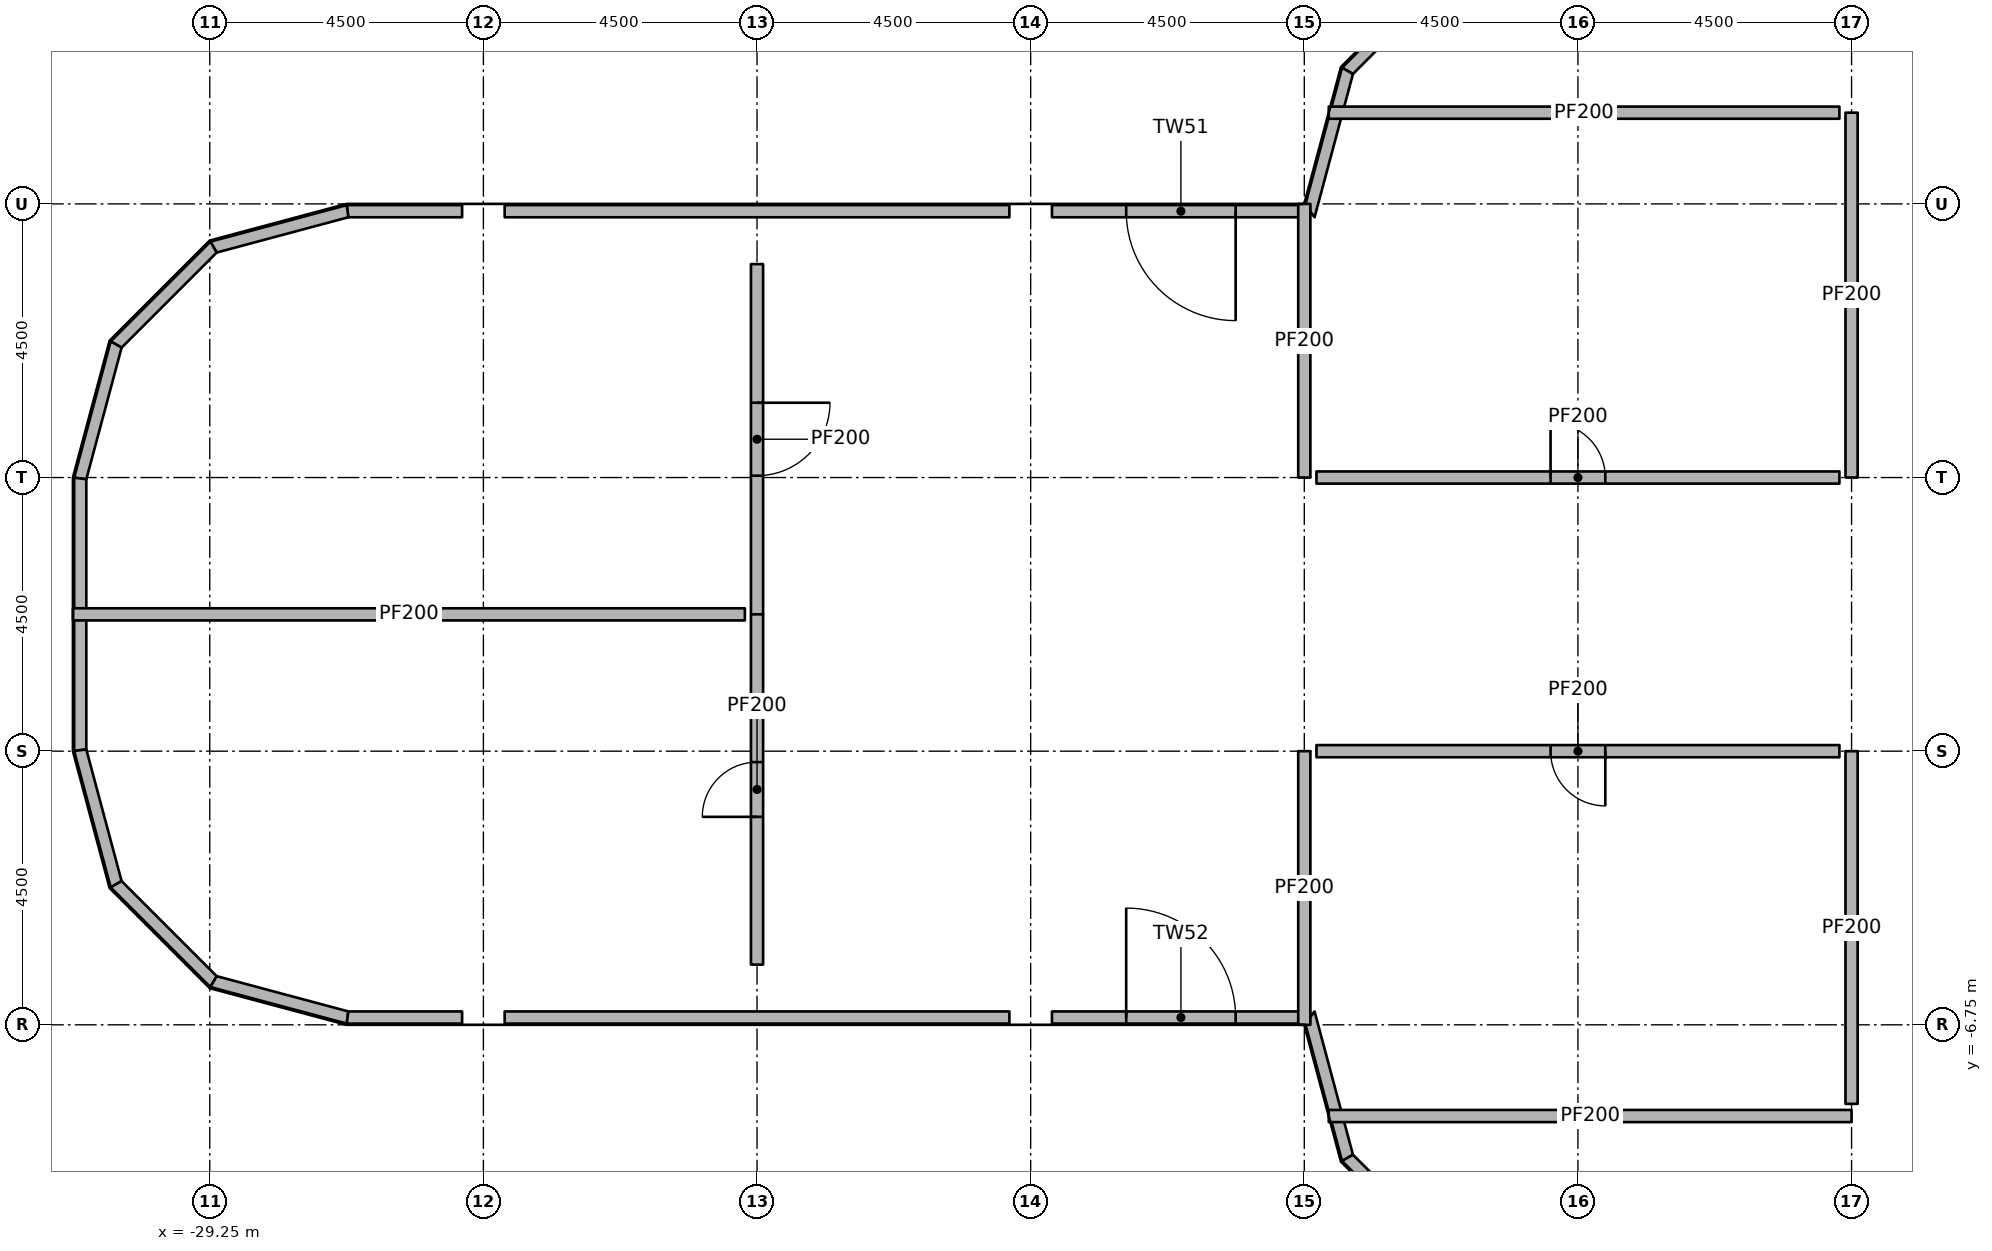
"""IFC4 building model, lengths in metres.
Left out: names, types, materials, properties, quantities, classifications, styles, units other than length and angle.
Written with IfcOpenShell. Run it as: python <this file> out.ifc"""

import sys

from ifc_helpers import new_model, si_unit, direction, frame, frame_2d, origin, origin_2d, place, context, subcontext, project, spatial, polyline, rectangle, outline, extrude, element, fill, save


model = new_model("IFC4")
c1 = context("Model", 3, precision=1e-05, world=origin(), true_north=direction((0.0, 1.0)))
c2 = subcontext(c1, "Body", "Model", "MODEL_VIEW")
j1 = project(units=[si_unit("LENGTHUNIT", "METRE"), si_unit("PLANEANGLEUNIT", "RADIAN")], contexts=[c1])
p1 = place(None, origin())
s1 = spatial("IfcSite", under=j1, at=p1, CompositionType="ELEMENT")
p2 = place(p1, origin())
s2 = spatial("IfcBuilding", under=s1, at=p2, CompositionType="ELEMENT")
p3 = place(p2, frame((0.0, 0.0, 244.8)))
s3 = spatial("IfcBuildingStorey", under=s2, at=p3, CompositionType="ELEMENT", Elevation=244.8)
for number, where, z_axis, x_axis in (
    (1, (-28.908, -5.475, 0.0), (0.0, 0.0, 1.0), (1.0, 0.0, 0.0)),
    (2, (-28.908, 5.475, 0.0), (0.0, 0.0, 1.0), (1.0, 0.0, 0.0)),
    (3, (-24.75, -6.25, 0.0), (0.0, 0.0, 1.0), (1.0, 0.0, 0.0)),
    (4, (-24.75, 6.25, 0.0), (0.0, 0.0, 1.0), (1.0, 0.0, 0.0)),
    (5, (-20.25, -6.11, 0.0), (0.0, 0.0, 1.0), (1.0, 0.0, 0.0)),
    (6, (-20.25, 6.11, 0.0), (0.0, 0.0, 1.0), (1.0, 0.0, 0.0)),
    (7, (-15.75, -6.25, 0.0), (0.0, 0.0, 1.0), (1.0, 0.0, 0.0)),
    (8, (-15.75, 6.25, 0.0), (0.0, 0.0, 1.0), (1.0, 0.0, 0.0)),
    (9, (-10.75, -6.25, 0.0), (0.0, 0.0, 1.0), (1.0, 0.0, 0.0)),
    (10, (-10.75, 6.25, 0.0), (0.0, 0.0, 1.0), (1.0, 0.0, 0.0)),
    (11, (-6.25, -6.25, 0.0), (0.0, 0.0, 1.0), (1.0, 0.0, 0.0)),
    (12, (-6.25, 6.25, 0.0), (0.0, 0.0, 1.0), (1.0, 0.0, 0.0)),
):
    element("IfcColumn", number, at=place(p3, frame(where, z_axis=z_axis, x_axis=x_axis)), inside=s3, PredefinedType="COLUMN", context=c2, shape_type="SweptSolid", body=[
        extrude(rectangle(XDim=0.7, YDim=0.7, at=origin_2d()), origin(), (0.0, 0.0, 1.0), 4.85),
    ])
p4 = place(p3, origin())
e13 = element("IfcWall", 13, at=p4, inside=s3, PredefinedType="SOLIDWALL", context=c2, shape_type="SweptSolid", body=[
    extrude(outline(polyline([(-8.99, 10.629), (-10.629, 8.99), (-10.45, 8.886), (-8.886, 10.45), (-8.99, 10.629)])), origin(), (0.0, 0.0, 1.0), 4.85),
])
p5 = place(p3, origin())
e14 = element("IfcWall", 14, at=p5, inside=s3, PredefinedType="SOLIDWALL", context=c2, shape_type="SweptSolid", body=[
    extrude(outline(polyline([(-10.629, 8.99), (-11.235, 6.73), (-11.081, 6.53), (-10.45, 8.886), (-10.629, 8.99)])), origin(), (0.0, 0.0, 1.0), 4.85),
])
p6 = place(p3, frame((-11.158, 6.63, 0.0), z_axis=(0.0, 0.0, 1.0), x_axis=(-1.0, 0.0, 0.0)))
e15 = element("IfcWall", 15, at=p6, inside=s3, PredefinedType="SOLIDWALL", context=c2, shape_type="SweptSolid", body=[
    extrude(rectangle(XDim=4.242, YDim=0.2, at=frame_2d((2.121, 0.0))), origin(), (0.0, 0.0, 1.0), 4.85),
])
p7 = place(p6, frame((1.221, 0.0, 0.0)))
e16 = element("IfcOpeningElement", 16, at=p7, cuts=e15, PredefinedType="OPENING", context=c2, shape_type="SweptSolid", body=[
    extrude(rectangle(XDim=1.8, YDim=2.4, at=frame_2d((0.9, 1.2))), frame((0.0, 0.11, 0.0), z_axis=(0.0, -1.0, 0.0), x_axis=(1.0, 0.0, 0.0)), (0.0, 0.0, 1.0), 0.22),
])
p8 = place(p3, origin())
e17 = element("IfcWall", 17, at=p8, inside=s3, PredefinedType="SOLIDWALL", context=c2, shape_type="SweptSolid", body=[
    extrude(outline(polyline([(-16.1, 6.73), (-24.4, 6.73), (-24.4, 6.53), (-16.1, 6.53), (-16.1, 6.73)])), origin(), (0.0, 0.0, 1.0), 4.85),
])
p9 = place(p3, origin())
e18 = element("IfcWall", 18, at=p9, inside=s3, PredefinedType="SOLIDWALL", context=c2, shape_type="SweptSolid", body=[
    extrude(outline(polyline([(-25.1, 6.73), (-26.997, 6.73), (-26.971, 6.53), (-25.1, 6.53), (-25.1, 6.73)])), origin(), (0.0, 0.0, 1.0), 4.85),
])
p10 = place(p3, origin())
e19 = element("IfcWall", 19, at=p10, inside=s3, PredefinedType="SOLIDWALL", context=c2, shape_type="SweptSolid", body=[
    extrude(outline(polyline([(-26.997, 6.73), (-29.24, 6.129), (-29.136, 5.95), (-26.971, 6.53), (-26.997, 6.73)])), origin(), (0.0, 0.0, 1.0), 4.85),
])
p11 = place(p3, origin())
e20 = element("IfcWall", 20, at=p11, inside=s3, PredefinedType="SOLIDWALL", context=c2, shape_type="SweptSolid", body=[
    extrude(outline(polyline([(-29.24, 6.129), (-30.879, 4.49), (-30.7, 4.386), (-29.136, 5.95), (-29.24, 6.129)])), origin(), (0.0, 0.0, 1.0), 4.85),
])
p12 = place(p3, origin())
e21 = element("IfcWall", 21, at=p12, inside=s3, PredefinedType="SOLIDWALL", context=c2, shape_type="SweptSolid", body=[
    extrude(outline(polyline([(-30.879, 4.49), (-31.48, 2.247), (-31.28, 2.221), (-30.7, 4.386), (-30.879, 4.49)])), origin(), (0.0, 0.0, 1.0), 4.85),
])
p13 = place(p3, origin())
e22 = element("IfcWall", 22, at=p13, inside=s3, PredefinedType="SOLIDWALL", context=c2, shape_type="SweptSolid", body=[
    extrude(outline(polyline([(-31.48, 2.247), (-31.48, -2.247), (-31.28, -2.221), (-31.28, 2.221), (-31.48, 2.247)])), origin(), (0.0, 0.0, 1.0), 4.85),
])
p14 = place(p3, origin())
e23 = element("IfcWall", 23, at=p14, inside=s3, PredefinedType="SOLIDWALL", context=c2, shape_type="SweptSolid", body=[
    extrude(outline(polyline([(-31.48, -2.247), (-30.879, -4.49), (-30.7, -4.386), (-31.28, -2.221), (-31.48, -2.247)])), origin(), (0.0, 0.0, 1.0), 4.85),
])
p15 = place(p3, origin())
e24 = element("IfcWall", 24, at=p15, inside=s3, PredefinedType="SOLIDWALL", context=c2, shape_type="SweptSolid", body=[
    extrude(outline(polyline([(-30.879, -4.49), (-29.24, -6.129), (-29.136, -5.95), (-30.7, -4.386), (-30.879, -4.49)])), origin(), (0.0, 0.0, 1.0), 4.85),
])
p16 = place(p3, origin())
e25 = element("IfcWall", 25, at=p16, inside=s3, PredefinedType="SOLIDWALL", context=c2, shape_type="SweptSolid", body=[
    extrude(outline(polyline([(-29.24, -6.129), (-26.997, -6.73), (-26.971, -6.53), (-29.136, -5.95), (-29.24, -6.129)])), origin(), (0.0, 0.0, 1.0), 4.85),
])
p17 = place(p3, origin())
e26 = element("IfcWall", 26, at=p17, inside=s3, PredefinedType="SOLIDWALL", context=c2, shape_type="SweptSolid", body=[
    extrude(outline(polyline([(-26.997, -6.73), (-25.1, -6.73), (-25.1, -6.53), (-26.971, -6.53), (-26.997, -6.73)])), origin(), (0.0, 0.0, 1.0), 4.85),
])
p18 = place(p3, origin())
e27 = element("IfcWall", 27, at=p18, inside=s3, PredefinedType="SOLIDWALL", context=c2, shape_type="SweptSolid", body=[
    extrude(outline(polyline([(-24.4, -6.73), (-16.1, -6.73), (-16.1, -6.53), (-24.4, -6.53), (-24.4, -6.73)])), origin(), (0.0, 0.0, 1.0), 4.85),
])
p19 = place(p3, frame((-15.4, -6.63, 0.0), z_axis=(0.0, 0.0, 1.0), x_axis=(1.0, 0.0, 0.0)))
e28 = element("IfcWall", 28, at=p19, inside=s3, PredefinedType="SOLIDWALL", context=c2, shape_type="SweptSolid", body=[
    extrude(rectangle(XDim=4.242, YDim=0.2, at=frame_2d((2.121, 0.0))), origin(), (0.0, 0.0, 1.0), 4.85),
])
p20 = place(p19, frame((1.221, 0.0, 0.0)))
e29 = element("IfcOpeningElement", 29, at=p20, cuts=e28, PredefinedType="OPENING", context=c2, shape_type="SweptSolid", body=[
    extrude(rectangle(XDim=1.8, YDim=2.4, at=frame_2d((0.9, 1.2))), frame((0.0, 0.11, 0.0), z_axis=(0.0, -1.0, 0.0), x_axis=(1.0, 0.0, 0.0)), (0.0, 0.0, 1.0), 0.22),
])
p21 = place(p3, origin())
e30 = element("IfcWall", 30, at=p21, inside=s3, PredefinedType="SOLIDWALL", context=c2, shape_type="SweptSolid", body=[
    extrude(outline(polyline([(-11.235, -6.73), (-10.629, -8.99), (-10.45, -8.886), (-11.081, -6.53), (-11.235, -6.73)])), origin(), (0.0, 0.0, 1.0), 4.85),
])
p22 = place(p3, origin())
e31 = element("IfcWall", 31, at=p22, inside=s3, PredefinedType="SOLIDWALL", context=c2, shape_type="SweptSolid", body=[
    extrude(outline(polyline([(-10.629, -8.99), (-8.99, -10.629), (-8.886, -10.45), (-10.45, -8.886), (-10.629, -8.99)])), origin(), (0.0, 0.0, 1.0), 4.85),
])
p23 = place(p3, frame((-2.25, 2.25, 0.0), z_axis=(0.0, 0.0, 1.0), x_axis=(0.0, 1.0, 0.0)))
e32 = element("IfcWall", 32, at=p23, inside=s3, PredefinedType="PARTITIONING", context=c2, shape_type="SweptSolid", body=[
    extrude(rectangle(XDim=6.0, YDim=0.2, at=frame_2d((3.0, 0.0))), origin(), (0.0, 0.0, 1.0), 4.073),
])
p24 = place(p3, frame((-2.45, 8.25, 0.0), z_axis=(0.0, 0.0, 1.0), x_axis=(-1.0, 0.0, 0.0)))
e33 = element("IfcWall", 33, at=p24, inside=s3, PredefinedType="PARTITIONING", context=c2, shape_type="SweptSolid", body=[
    extrude(rectangle(XDim=8.398, YDim=0.2, at=frame_2d((4.199, 0.0))), origin(), (0.0, 0.0, 1.0), 3.93),
])
p25 = place(p3, frame((-10.848, -8.25, 0.0), z_axis=(0.0, 0.0, 1.0), x_axis=(1.0, 0.0, 0.0)))
e34 = element("IfcWall", 34, at=p25, inside=s3, PredefinedType="PARTITIONING", context=c2, shape_type="SweptSolid", body=[
    extrude(rectangle(XDim=8.598, YDim=0.2, at=frame_2d((4.299, 0.0))), origin(), (0.0, 0.0, 1.0), 3.93),
])
p26 = place(p3, frame((-2.25, -8.05, 0.0), z_axis=(0.0, 0.0, 1.0), x_axis=(0.0, 1.0, 0.0)))
e35 = element("IfcWall", 35, at=p26, inside=s3, PredefinedType="PARTITIONING", context=c2, shape_type="SweptSolid", body=[
    extrude(rectangle(XDim=5.8, YDim=0.2, at=frame_2d((2.9, 0.0))), origin(), (0.0, 0.0, 1.0), 4.073),
])
p27 = place(p3, frame((-11.25, 2.25, 0.0), z_axis=(0.0, 0.0, 1.0), x_axis=(0.0, 1.0, 0.0)))
e36 = element("IfcWall", 36, at=p27, inside=s3, PredefinedType="PARTITIONING", context=c2, shape_type="SweptSolid", body=[
    extrude(rectangle(XDim=4.5, YDim=0.2, at=frame_2d((2.25, 0.0))), origin(), (0.0, 0.0, 1.0), 3.93),
])
p28 = place(p3, frame((-11.05, 2.25, 0.0), z_axis=(0.0, 0.0, 1.0), x_axis=(1.0, 0.0, 0.0)))
e37 = element("IfcWall", 37, at=p28, inside=s3, PredefinedType="PARTITIONING", context=c2, shape_type="SweptSolid", body=[
    extrude(rectangle(XDim=8.6, YDim=0.2, at=frame_2d((4.3, 0.0))), origin(), (0.0, 0.0, 1.0), 4.223),
])
p29 = place(p28, frame((3.85, 0.0, 0.0)))
e38 = element("IfcOpeningElement", 38, at=p29, cuts=e37, PredefinedType="OPENING", context=c2, shape_type="SweptSolid", body=[
    extrude(rectangle(XDim=0.9, YDim=2.1, at=frame_2d((0.45, 1.05))), frame((0.0, 0.11, 0.0), z_axis=(0.0, -1.0, 0.0), x_axis=(1.0, 0.0, 0.0)), (0.0, 0.0, 1.0), 0.22),
])
p30 = place(p3, frame((-11.25, -6.75, 0.0), z_axis=(0.0, 0.0, 1.0), x_axis=(0.0, 1.0, 0.0)))
e39 = element("IfcWall", 39, at=p30, inside=s3, PredefinedType="PARTITIONING", context=c2, shape_type="SweptSolid", body=[
    extrude(rectangle(XDim=4.5, YDim=0.2, at=frame_2d((2.25, 0.0))), origin(), (0.0, 0.0, 1.0), 3.93),
])
p31 = place(p3, frame((-2.45, -2.25, 0.0), z_axis=(0.0, 0.0, 1.0), x_axis=(-1.0, 0.0, 0.0)))
e40 = element("IfcWall", 40, at=p31, inside=s3, PredefinedType="PARTITIONING", context=c2, shape_type="SweptSolid", body=[
    extrude(rectangle(XDim=8.6, YDim=0.2, at=frame_2d((4.3, 0.0))), origin(), (0.0, 0.0, 1.0), 4.223),
])
p32 = place(p31, frame((3.85, 0.0, 0.0)))
e41 = element("IfcOpeningElement", 41, at=p32, cuts=e40, PredefinedType="OPENING", context=c2, shape_type="SweptSolid", body=[
    extrude(rectangle(XDim=0.9, YDim=2.1, at=frame_2d((0.45, 1.05))), frame((0.0, 0.11, 0.0), z_axis=(0.0, -1.0, 0.0), x_axis=(1.0, 0.0, 0.0)), (0.0, 0.0, 1.0), 0.22),
])
p33 = place(p3, frame((-20.25, 5.76, 0.0), z_axis=(0.0, 0.0, 1.0), x_axis=(0.0, -1.0, 0.0)))
e42 = element("IfcWall", 42, at=p33, inside=s3, PredefinedType="PARTITIONING", context=c2, shape_type="SweptSolid", body=[
    extrude(rectangle(XDim=5.76, YDim=0.2, at=frame_2d((2.88, 0.0))), origin(), (0.0, 0.0, 1.0), 4.223),
])
p34 = place(p33, frame((2.28, 0.0, 0.0)))
e43 = element("IfcOpeningElement", 43, at=p34, cuts=e42, PredefinedType="OPENING", context=c2, shape_type="SweptSolid", body=[
    extrude(rectangle(XDim=1.2, YDim=2.1, at=frame_2d((0.6, 1.05))), frame((0.0, 0.11, 0.0), z_axis=(0.0, -1.0, 0.0), x_axis=(1.0, 0.0, 0.0)), (0.0, 0.0, 1.0), 0.22),
])
p35 = place(p3, frame((-20.25, -5.76, 0.0), z_axis=(0.0, 0.0, 1.0), x_axis=(0.0, 1.0, 0.0)))
e44 = element("IfcWall", 44, at=p35, inside=s3, PredefinedType="PARTITIONING", context=c2, shape_type="SweptSolid", body=[
    extrude(rectangle(XDim=5.76, YDim=0.2, at=frame_2d((2.88, 0.0))), origin(), (0.0, 0.0, 1.0), 4.223),
])
p36 = place(p35, frame((2.43, 0.0, 0.0)))
e45 = element("IfcOpeningElement", 45, at=p36, cuts=e44, PredefinedType="OPENING", context=c2, shape_type="SweptSolid", body=[
    extrude(rectangle(XDim=0.9, YDim=2.1, at=frame_2d((0.45, 1.05))), frame((0.0, 0.11, 0.0), z_axis=(0.0, -1.0, 0.0), x_axis=(1.0, 0.0, 0.0)), (0.0, 0.0, 1.0), 0.22),
])
p37 = place(p3, frame((-20.45, 0.0, 0.0), z_axis=(0.0, 0.0, 1.0), x_axis=(-1.0, 0.0, 0.0)))
e46 = element("IfcWall", 46, at=p37, inside=s3, PredefinedType="PARTITIONING", context=c2, shape_type="SweptSolid", body=[
    extrude(rectangle(XDim=11.05, YDim=0.2, at=frame_2d((5.525, 0.0))), origin(), (0.0, 0.0, 1.0), 3.93),
])
p38 = place(p7, origin())
e47 = element("IfcDoor", 47, at=p38, inside=s3, OperationType="SINGLE_SWING_LEFT", PredefinedType="DOOR", context=c2, shape_type="SweptSolid", body=[
    extrude(rectangle(XDim=1.8, YDim=2.4, at=frame_2d((0.9, 1.2))), frame((0.0, 0.025, 0.0), z_axis=(0.0, -1.0, 0.0), x_axis=(1.0, 0.0, 0.0)), (0.0, 0.0, 1.0), 0.05),
])
fill(e16, e47)
p39 = place(p20, origin())
e48 = element("IfcDoor", 48, at=p39, inside=s3, OperationType="SINGLE_SWING_LEFT", PredefinedType="DOOR", context=c2, shape_type="SweptSolid", body=[
    extrude(rectangle(XDim=1.8, YDim=2.4, at=frame_2d((0.9, 1.2))), frame((0.0, 0.025, 0.0), z_axis=(0.0, -1.0, 0.0), x_axis=(1.0, 0.0, 0.0)), (0.0, 0.0, 1.0), 0.05),
])
fill(e29, e48)
p40 = place(p29, origin())
e49 = element("IfcDoor", 49, at=p40, inside=s3, OperationType="SINGLE_SWING_LEFT", PredefinedType="DOOR", context=c2, shape_type="SweptSolid", body=[
    extrude(rectangle(XDim=0.9, YDim=2.1, at=frame_2d((0.45, 1.05))), frame((0.0, 0.025, 0.0), z_axis=(0.0, -1.0, 0.0), x_axis=(1.0, 0.0, 0.0)), (0.0, 0.0, 1.0), 0.05),
])
fill(e38, e49)
p41 = place(p32, origin())
e50 = element("IfcDoor", 50, at=p41, inside=s3, OperationType="SINGLE_SWING_LEFT", PredefinedType="DOOR", context=c2, shape_type="SweptSolid", body=[
    extrude(rectangle(XDim=0.9, YDim=2.1, at=frame_2d((0.45, 1.05))), frame((0.0, 0.025, 0.0), z_axis=(0.0, -1.0, 0.0), x_axis=(1.0, 0.0, 0.0)), (0.0, 0.0, 1.0), 0.05),
])
fill(e41, e50)
p42 = place(p34, origin())
e51 = element("IfcDoor", 51, at=p42, inside=s3, OperationType="SINGLE_SWING_LEFT", PredefinedType="DOOR", context=c2, shape_type="SweptSolid", body=[
    extrude(rectangle(XDim=1.2, YDim=2.1, at=frame_2d((0.6, 1.05))), frame((0.0, 0.025, 0.0), z_axis=(0.0, -1.0, 0.0), x_axis=(1.0, 0.0, 0.0)), (0.0, 0.0, 1.0), 0.05),
])
fill(e43, e51)
p43 = place(p36, origin())
e52 = element("IfcDoor", 52, at=p43, inside=s3, OperationType="SINGLE_SWING_LEFT", PredefinedType="DOOR", context=c2, shape_type="SweptSolid", body=[
    extrude(rectangle(XDim=0.9, YDim=2.1, at=frame_2d((0.45, 1.05))), frame((0.0, 0.025, 0.0), z_axis=(0.0, -1.0, 0.0), x_axis=(1.0, 0.0, 0.0)), (0.0, 0.0, 1.0), 0.05),
])
fill(e45, e52)
save(model, sys.argv[1])
